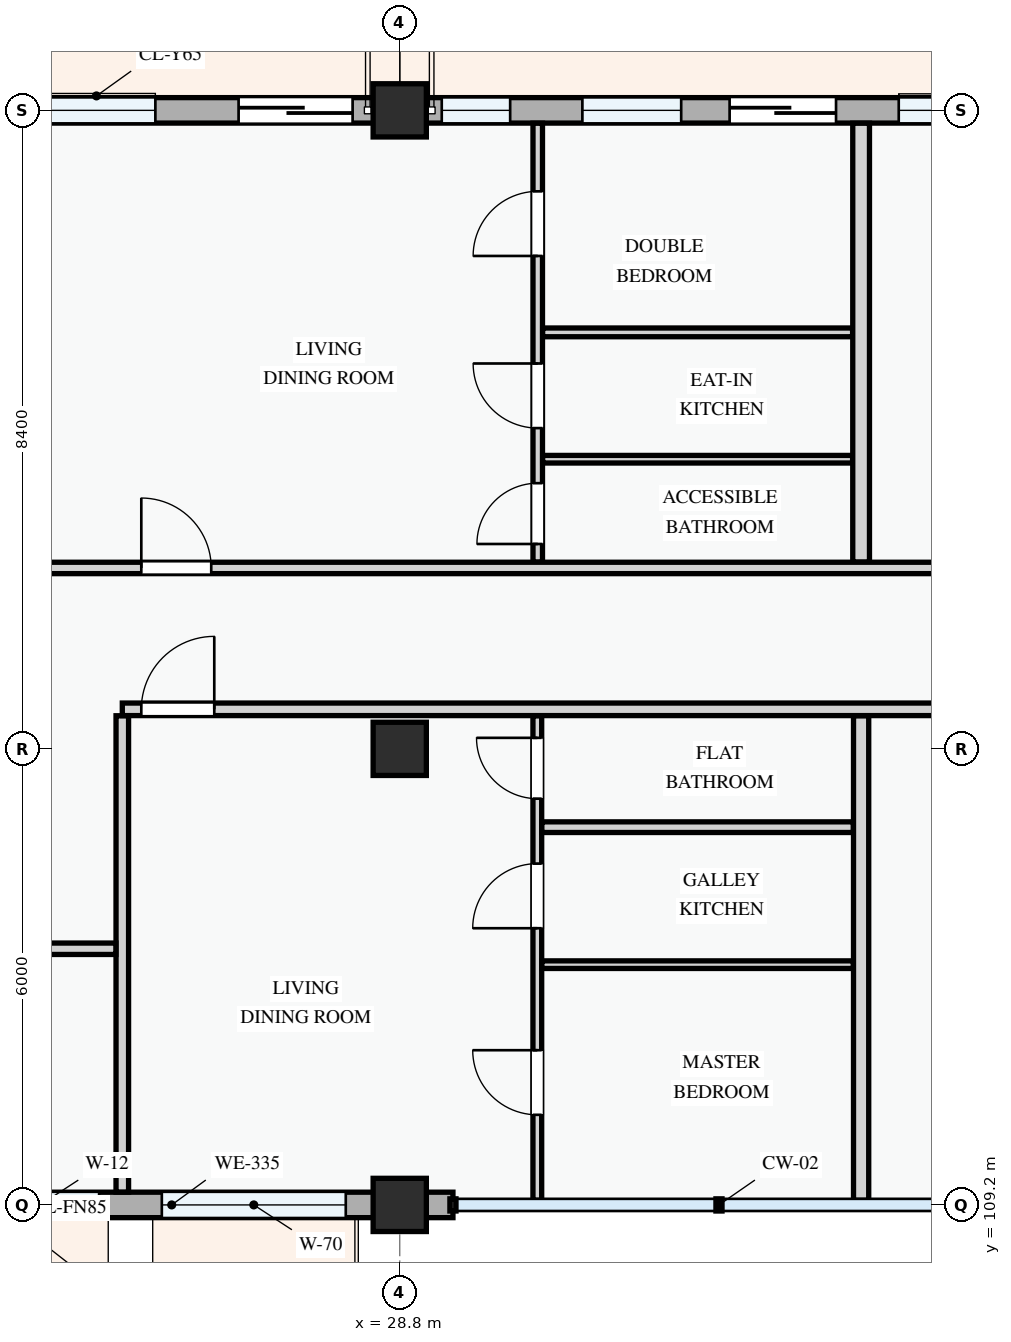
"""IFC4 building model, lengths in metres.
Left out: names, types, materials, properties, quantities, classifications, styles, units other than length and angle.
Written with IfcOpenShell. Run it as: python <this file> out.ifc"""

import sys

from ifc_helpers import new_model, si_unit, direction, frame, frame_2d, origin, origin_2d, place, context, subcontext, project, spatial, rectangle, extrude, element, fill, save


model = new_model("IFC4")
c1 = context("Model", 3, precision=1e-05, world=origin(), true_north=direction((0.0, 1.0)))
c2 = subcontext(c1, "Body", "Model", "MODEL_VIEW")
j1 = project(units=[si_unit("LENGTHUNIT", "METRE"), si_unit("PLANEANGLEUNIT", "RADIAN")], contexts=[c1])
p1 = place(None, origin())
s1 = spatial("IfcSite", under=j1, at=p1, CompositionType="ELEMENT")
p2 = place(p1, origin())
s2 = spatial("IfcBuilding", under=s1, at=p2, CompositionType="ELEMENT")
p3 = place(p2, frame((0.0, 0.0, 18.0)))
s3 = spatial("IfcBuildingStorey", under=s2, at=p3, CompositionType="ELEMENT", Elevation=18.0)
for number, where, z_axis, x_axis in (
    (1, (28.8, 109.2, 0.0), (0.0, 0.0, 1.0), (1.0, 0.0, 0.0)),
    (2, (28.8, 115.2, 0.0), (0.0, 0.0, 1.0), (1.0, 0.0, 0.0)),
    (3, (28.8, 123.6, 0.0), (0.0, 0.0, 1.0), (1.0, 0.0, 0.0)),
):
    element("IfcColumn", number, at=place(p3, frame(where, z_axis=z_axis, x_axis=x_axis)), inside=s3, PredefinedType="COLUMN", context=c2, shape_type="SweptSolid", body=[
        extrude(rectangle(XDim=0.7, YDim=0.7, at=origin_2d()), origin(), (0.0, 0.0, 1.0), 3.3),
    ])
p4 = place(p3, frame((22.8, 109.2, 0.0), z_axis=(0.0, 0.0, 1.0), x_axis=(1.0, 0.0, 0.0)))
e4 = element("IfcWall", 4, at=p4, inside=s3, PredefinedType="STANDARD", context=c2, shape_type="SweptSolid", body=[
    extrude(rectangle(XDim=6.0, YDim=0.335, at=frame_2d((3.0, 0.0))), origin(), (0.0, 0.0, 1.0), 2.475),
])
p5 = place(p4, frame((0.495, 0.0, 0.78)))
e5 = element("IfcOpeningElement", 5, at=p5, cuts=e4, PredefinedType="OPENING", context=c2, shape_type="SweptSolid", body=[
    extrude(rectangle(XDim=1.55, YDim=1.4, at=frame_2d((0.775, 0.7))), frame((0.0, 0.177, 0.0), z_axis=(0.0, -1.0, 0.0), x_axis=(1.0, 0.0, 0.0)), (0.0, 0.0, 1.0), 0.355),
])
p6 = place(p4, frame((2.87, 0.0, 0.78)))
e6 = element("IfcOpeningElement", 6, at=p6, cuts=e4, PredefinedType="OPENING", context=c2, shape_type="SweptSolid", body=[
    extrude(rectangle(XDim=2.42, YDim=1.52, at=frame_2d((1.21, 0.76))), frame((0.0, 0.177, 0.0), z_axis=(0.0, -1.0, 0.0), x_axis=(1.0, 0.0, 0.0)), (0.0, 0.0, 1.0), 0.355),
])
p7 = place(p3, frame((28.8, 109.2, 0.0), z_axis=(0.0, 0.0, 1.0), x_axis=(1.0, 0.0, 0.0)))
e7 = element("IfcWall", 7, at=p7, inside=s3, PredefinedType="STANDARD", context=c2, shape_type="SweptSolid", body=[
    extrude(rectangle(XDim=0.7, YDim=0.335, at=frame_2d((0.35, 0.0))), origin(), (0.0, 0.0, 1.0), 2.375),
])
p8 = place(p3, frame((37.2, 123.6, 0.0), z_axis=(0.0, 0.0, 1.0), x_axis=(-1.0, 0.0, 0.0)))
e8 = element("IfcWall", 8, at=p8, inside=s3, PredefinedType="STANDARD", context=c2, shape_type="SweptSolid", body=[
    extrude(rectangle(XDim=8.4, YDim=0.335, at=frame_2d((4.2, 0.0))), origin(), (0.0, 0.0, 1.0), 2.375),
])
p9 = place(p8, frame((2.66, 0.0, 0.0)))
e9 = element("IfcOpeningElement", 9, at=p9, cuts=e8, PredefinedType="OPENING", context=c2, shape_type="SweptSolid", body=[
    extrude(rectangle(XDim=1.4, YDim=2.2, at=frame_2d((0.7, 1.1))), frame((0.0, 0.177, 0.0), z_axis=(0.0, -1.0, 0.0), x_axis=(1.0, 0.0, 0.0)), (0.0, 0.0, 1.0), 0.355),
])
p10 = place(p8, frame((0.685, 0.0, 0.78)))
e10 = element("IfcOpeningElement", 10, at=p10, cuts=e8, PredefinedType="OPENING", context=c2, shape_type="SweptSolid", body=[
    extrude(rectangle(XDim=1.15, YDim=1.25, at=frame_2d((0.575, 0.625))), frame((0.0, 0.177, 0.0), z_axis=(0.0, -1.0, 0.0), x_axis=(1.0, 0.0, 0.0)), (0.0, 0.0, 1.0), 0.355),
])
p11 = place(p8, frame((4.697, 0.0, 0.78)))
e11 = element("IfcOpeningElement", 11, at=p11, cuts=e8, PredefinedType="OPENING", context=c2, shape_type="SweptSolid", body=[
    extrude(rectangle(XDim=1.3, YDim=1.4, at=frame_2d((0.65, 0.7))), frame((0.0, 0.177, 0.0), z_axis=(0.0, -1.0, 0.0), x_axis=(1.0, 0.0, 0.0)), (0.0, 0.0, 1.0), 0.355),
])
p12 = place(p8, frame((6.947, 0.0, 0.78)))
e12 = element("IfcOpeningElement", 12, at=p12, cuts=e8, PredefinedType="OPENING", context=c2, shape_type="SweptSolid", body=[
    extrude(rectangle(XDim=0.9, YDim=1.2, at=frame_2d((0.45, 0.6))), frame((0.0, 0.177, 0.0), z_axis=(0.0, -1.0, 0.0), x_axis=(1.0, 0.0, 0.0)), (0.0, 0.0, 1.0), 0.355),
])
p13 = place(p3, frame((28.8, 123.6, 0.0), z_axis=(0.0, 0.0, 1.0), x_axis=(-1.0, 0.0, 0.0)))
e13 = element("IfcWall", 13, at=p13, inside=s3, PredefinedType="STANDARD", context=c2, shape_type="SweptSolid", body=[
    extrude(rectangle(XDim=6.0, YDim=0.335, at=frame_2d((3.0, 0.0))), origin(), (0.0, 0.0, 1.0), 2.475),
])
p14 = place(p13, frame((0.62, 0.0, 0.0)))
e14 = element("IfcOpeningElement", 14, at=p14, cuts=e13, PredefinedType="OPENING", context=c2, shape_type="SweptSolid", body=[
    extrude(rectangle(XDim=1.5, YDim=2.2, at=frame_2d((0.75, 1.1))), frame((0.0, 0.177, 0.0), z_axis=(0.0, -1.0, 0.0), x_axis=(1.0, 0.0, 0.0)), (0.0, 0.0, 1.0), 0.355),
])
p15 = place(p13, frame((3.215, 0.0, 0.78)))
e15 = element("IfcOpeningElement", 15, at=p15, cuts=e13, PredefinedType="OPENING", context=c2, shape_type="SweptSolid", body=[
    extrude(rectangle(XDim=1.55, YDim=1.4, at=frame_2d((0.775, 0.7))), frame((0.0, 0.177, 0.0), z_axis=(0.0, -1.0, 0.0), x_axis=(1.0, 0.0, 0.0)), (0.0, 0.0, 1.0), 0.355),
])
p16 = place(p3, frame((25.15, 109.369, 0.0), z_axis=(0.0, 0.0, 1.0), x_axis=(0.0, 1.0, 0.0)))
e16 = element("IfcWall", 16, at=p16, inside=s3, PredefinedType="PARTITIONING", context=c2, shape_type="SweptSolid", body=[
    extrude(rectangle(XDim=6.266, YDim=0.165, at=frame_2d((3.133, 0.0))), origin(), (0.0, 0.0, 1.0), 3.0),
])
p17 = place(p3, frame((22.66, 112.57, 0.0), z_axis=(0.0, 0.0, 1.0), x_axis=(1.0, 0.0, 0.0)))
e17 = element("IfcWall", 17, at=p17, inside=s3, PredefinedType="PARTITIONING", context=c2, shape_type="SweptSolid", body=[
    extrude(rectangle(XDim=2.406, YDim=0.15, at=frame_2d((1.203, 0.0))), origin(), (0.0, 0.0, 1.0), 3.0),
])
p18 = place(p3, frame((30.61, 109.26, 0.0), z_axis=(0.0, 0.0, 1.0), x_axis=(0.0, 1.0, 0.0)))
e18 = element("IfcWall", 18, at=p18, inside=s3, PredefinedType="PARTITIONING", context=c2, shape_type="SweptSolid", body=[
    extrude(rectangle(XDim=6.375, YDim=0.115, at=frame_2d((3.188, 0.0))), origin(), (0.0, 0.0, 1.0), 3.0),
])
p19 = place(p18, frame((1.125, 0.0, 0.0)))
e19 = element("IfcOpeningElement", 19, at=p19, cuts=e18, PredefinedType="OPENING", context=c2, shape_type="SweptSolid", body=[
    extrude(rectangle(XDim=0.85, YDim=2.1, at=frame_2d((0.425, 1.05))), frame((0.0, 0.067, 0.0), z_axis=(0.0, -1.0, 0.0), x_axis=(1.0, 0.0, 0.0)), (0.0, 0.0, 1.0), 0.135),
])
p20 = place(p18, frame((3.58, 0.0, 0.0)))
e20 = element("IfcOpeningElement", 20, at=p20, cuts=e18, PredefinedType="OPENING", context=c2, shape_type="SweptSolid", body=[
    extrude(rectangle(XDim=0.85, YDim=2.1, at=frame_2d((0.425, 1.05))), frame((0.0, 0.067, 0.0), z_axis=(0.0, -1.0, 0.0), x_axis=(1.0, 0.0, 0.0)), (0.0, 0.0, 1.0), 0.135),
])
p21 = place(p18, frame((5.285, 0.0, 0.0)))
e21 = element("IfcOpeningElement", 21, at=p21, cuts=e18, PredefinedType="OPENING", context=c2, shape_type="SweptSolid", body=[
    extrude(rectangle(XDim=0.8, YDim=2.1, at=frame_2d((0.4, 1.05))), frame((0.0, 0.067, 0.0), z_axis=(0.0, -1.0, 0.0), x_axis=(1.0, 0.0, 0.0)), (0.0, 0.0, 1.0), 0.135),
])
p22 = place(p3, frame((30.669, 112.361, 0.0), z_axis=(0.0, 0.0, 1.0), x_axis=(1.0, 0.0, 0.0)))
e22 = element("IfcWall", 22, at=p22, inside=s3, PredefinedType="PARTITIONING", context=c2, shape_type="SweptSolid", body=[
    extrude(rectangle(XDim=4.099, YDim=0.1, at=frame_2d((2.049, 0.0))), origin(), (0.0, 0.0, 1.0), 3.0),
])
p23 = place(p3, frame((30.669, 114.17, 0.0), z_axis=(0.0, 0.0, 1.0), x_axis=(1.0, 0.0, 0.0)))
e23 = element("IfcWall", 23, at=p23, inside=s3, PredefinedType="PARTITIONING", context=c2, shape_type="SweptSolid", body=[
    extrude(rectangle(XDim=4.099, YDim=0.14, at=frame_2d((2.049, 0.0))), origin(), (0.0, 0.0, 1.0), 3.0),
])
p24 = place(p3, frame((30.615, 117.657, 0.0), z_axis=(0.0, 0.0, 1.0), x_axis=(0.0, 1.0, 0.0)))
e24 = element("IfcWall", 24, at=p24, inside=s3, PredefinedType="PARTITIONING", context=c2, shape_type="SweptSolid", body=[
    extrude(rectangle(XDim=5.773, YDim=0.125, at=frame_2d((2.887, 0.0))), origin(), (0.0, 0.0, 1.0), 3.0),
])
p25 = place(p24, frame((0.238, 0.0, 0.0)))
e25 = element("IfcOpeningElement", 25, at=p25, cuts=e24, PredefinedType="OPENING", context=c2, shape_type="SweptSolid", body=[
    extrude(rectangle(XDim=0.8, YDim=2.1, at=frame_2d((0.4, 1.05))), frame((0.0, 0.073, 0.0), z_axis=(0.0, -1.0, 0.0), x_axis=(1.0, 0.0, 0.0)), (0.0, 0.0, 1.0), 0.145),
])
p26 = place(p24, frame((1.763, 0.0, 0.0)))
e26 = element("IfcOpeningElement", 26, at=p26, cuts=e24, PredefinedType="OPENING", context=c2, shape_type="SweptSolid", body=[
    extrude(rectangle(XDim=0.85, YDim=2.1, at=frame_2d((0.425, 1.05))), frame((0.0, 0.073, 0.0), z_axis=(0.0, -1.0, 0.0), x_axis=(1.0, 0.0, 0.0)), (0.0, 0.0, 1.0), 0.145),
])
p27 = place(p24, frame((4.028, 0.0, 0.0)))
e27 = element("IfcOpeningElement", 27, at=p27, cuts=e24, PredefinedType="OPENING", context=c2, shape_type="SweptSolid", body=[
    extrude(rectangle(XDim=0.85, YDim=2.1, at=frame_2d((0.425, 1.05))), frame((0.0, 0.073, 0.0), z_axis=(0.0, -1.0, 0.0), x_axis=(1.0, 0.0, 0.0)), (0.0, 0.0, 1.0), 0.145),
])
p28 = place(p3, frame((30.68, 120.679, 0.0), z_axis=(0.0, 0.0, 1.0), x_axis=(1.0, 0.0, 0.0)))
e28 = element("IfcWall", 28, at=p28, inside=s3, PredefinedType="PARTITIONING", context=c2, shape_type="SweptSolid", body=[
    extrude(rectangle(XDim=4.078, YDim=0.115, at=frame_2d((2.039, 0.0))), origin(), (0.0, 0.0, 1.0), 3.0),
])
p29 = place(p3, frame((30.68, 119.01, 0.0), z_axis=(0.0, 0.0, 1.0), x_axis=(1.0, 0.0, 0.0)))
e29 = element("IfcWall", 29, at=p29, inside=s3, PredefinedType="PARTITIONING", context=c2, shape_type="SweptSolid", body=[
    extrude(rectangle(XDim=4.078, YDim=0.1, at=frame_2d((2.039, 0.0))), origin(), (0.0, 0.0, 1.0), 3.0),
])
p30 = place(p3, frame((34.87, 109.26, 0.0), z_axis=(0.0, 0.0, 1.0), x_axis=(0.0, 1.0, 0.0)))
e30 = element("IfcWall", 30, at=p30, inside=s3, PredefinedType="PARTITIONING", context=c2, shape_type="SweptSolid", body=[
    extrude(rectangle(XDim=6.375, YDim=0.2, at=frame_2d((3.188, 0.0))), origin(), (0.0, 0.0, 1.0), 3.0),
])
p31 = place(p3, frame((34.87, 117.657, 0.0), z_axis=(0.0, 0.0, 1.0), x_axis=(0.0, 1.0, 0.0)))
e31 = element("IfcWall", 31, at=p31, inside=s3, PredefinedType="PARTITIONING", context=c2, shape_type="SweptSolid", body=[
    extrude(rectangle(XDim=5.773, YDim=0.22, at=frame_2d((2.887, 0.0))), origin(), (0.0, 0.0, 1.0), 3.0),
])
p32 = place(p3, frame((25.15, 115.72, 0.0), z_axis=(0.0, 0.0, 1.0), x_axis=(1.0, 0.0, 0.0)))
e32 = element("IfcWall", 32, at=p32, inside=s3, PredefinedType="PARTITIONING", context=c2, shape_type="SweptSolid", body=[
    extrude(rectangle(XDim=32.281, YDim=0.165, at=frame_2d((16.14, 0.0))), origin(), (0.0, 0.0, 1.0), 3.0),
])
p33 = place(p32, frame((0.25, 0.0, 0.0)))
e33 = element("IfcOpeningElement", 33, at=p33, cuts=e32, PredefinedType="OPENING", context=c2, shape_type="SweptSolid", body=[
    extrude(rectangle(XDim=0.96, YDim=2.12, at=frame_2d((0.48, 1.06))), frame((0.0, 0.093, 0.0), z_axis=(0.0, -1.0, 0.0), x_axis=(1.0, 0.0, 0.0)), (0.0, 0.0, 1.0), 0.185),
])
p34 = place(p32, frame((14.015, 0.0, 0.0)))
e34 = element("IfcOpeningElement", 34, at=p34, cuts=e32, PredefinedType="OPENING", context=c2, shape_type="SweptSolid", body=[
    extrude(rectangle(XDim=0.92, YDim=2.1, at=frame_2d((0.46, 1.05))), frame((0.0, 0.093, 0.0), z_axis=(0.0, -1.0, 0.0), x_axis=(1.0, 0.0, 0.0)), (0.0, 0.0, 1.0), 0.185),
])
p35 = place(p32, frame((21.739, 0.0, 0.0)))
e35 = element("IfcOpeningElement", 35, at=p35, cuts=e32, PredefinedType="OPENING", context=c2, shape_type="SweptSolid", body=[
    extrude(rectangle(XDim=0.92, YDim=2.1, at=frame_2d((0.46, 1.05))), frame((0.0, 0.093, 0.0), z_axis=(0.0, -1.0, 0.0), x_axis=(1.0, 0.0, 0.0)), (0.0, 0.0, 1.0), 0.185),
])
p36 = place(p3, frame((22.66, 117.58, 0.0), z_axis=(0.0, 0.0, 1.0), x_axis=(1.0, 0.0, 0.0)))
e36 = element("IfcWall", 36, at=p36, inside=s3, PredefinedType="PARTITIONING", context=c2, shape_type="SweptSolid", body=[
    extrude(rectangle(XDim=34.88, YDim=0.15, at=frame_2d((17.44, 0.0))), origin(), (0.0, 0.0, 1.0), 3.0),
])
p37 = place(p36, frame((2.74, 0.0, 0.0)))
e37 = element("IfcOpeningElement", 37, at=p37, cuts=e36, PredefinedType="OPENING", context=c2, shape_type="SweptSolid", body=[
    extrude(rectangle(XDim=0.92, YDim=2.1, at=frame_2d((0.46, 1.05))), frame((0.0, 0.085, 0.0), z_axis=(0.0, -1.0, 0.0), x_axis=(1.0, 0.0, 0.0)), (0.0, 0.0, 1.0), 0.17),
])
p38 = place(p36, frame((16.285, 0.0, 0.0)))
e38 = element("IfcOpeningElement", 38, at=p38, cuts=e36, PredefinedType="OPENING", context=c2, shape_type="SweptSolid", body=[
    extrude(rectangle(XDim=0.92, YDim=2.1, at=frame_2d((0.46, 1.05))), frame((0.0, 0.085, 0.0), z_axis=(0.0, -1.0, 0.0), x_axis=(1.0, 0.0, 0.0)), (0.0, 0.0, 1.0), 0.17),
])
p39 = place(p36, frame((24.263, 0.0, 0.0)))
e39 = element("IfcOpeningElement", 39, at=p39, cuts=e36, PredefinedType="OPENING", context=c2, shape_type="SweptSolid", body=[
    extrude(rectangle(XDim=0.96, YDim=2.12, at=frame_2d((0.48, 1.06))), frame((0.0, 0.085, 0.0), z_axis=(0.0, -1.0, 0.0), x_axis=(1.0, 0.0, 0.0)), (0.0, 0.0, 1.0), 0.17),
])
p40 = place(p5, origin())
e40 = element("IfcWindow", 40, at=p40, inside=s3, PartitioningType="SINGLE_PANEL", PredefinedType="WINDOW", context=c2, shape_type="SweptSolid", body=[
    extrude(rectangle(XDim=1.55, YDim=1.4, at=frame_2d((0.775, 0.7))), frame((0.0, 0.03, 0.0), z_axis=(0.0, -1.0, 0.0), x_axis=(1.0, 0.0, 0.0)), (0.0, 0.0, 1.0), 0.06),
])
fill(e5, e40)
p41 = place(p6, origin())
e41 = element("IfcWindow", 41, at=p41, inside=s3, PartitioningType="DOUBLE_PANEL_VERTICAL", PredefinedType="WINDOW", context=c2, shape_type="SweptSolid", body=[
    extrude(rectangle(XDim=2.42, YDim=1.52, at=frame_2d((1.21, 0.76))), frame((0.0, 0.03, 0.0), z_axis=(0.0, -1.0, 0.0), x_axis=(1.0, 0.0, 0.0)), (0.0, 0.0, 1.0), 0.06),
])
fill(e6, e41)
p42 = place(p9, frame((1.4, 0.0, 0.0), z_axis=(0.0, 0.0, 1.0), x_axis=(-1.0, 0.0, 0.0)))
e42 = element("IfcDoor", 42, at=p42, inside=s3, OperationType="SLIDING_TO_LEFT", PredefinedType="DOOR", context=c2, shape_type="SweptSolid", body=[
    extrude(rectangle(XDim=1.4, YDim=2.2, at=frame_2d((0.7, 1.1))), frame((0.0, 0.025, 0.0), z_axis=(0.0, -1.0, 0.0), x_axis=(1.0, 0.0, 0.0)), (0.0, 0.0, 1.0), 0.05),
])
fill(e9, e42)
p43 = place(p10, origin())
e43 = element("IfcWindow", 43, at=p43, inside=s3, PartitioningType="SINGLE_PANEL", PredefinedType="WINDOW", context=c2, shape_type="SweptSolid", body=[
    extrude(rectangle(XDim=1.15, YDim=1.25, at=frame_2d((0.575, 0.625))), frame((0.0, 0.03, 0.0), z_axis=(0.0, -1.0, 0.0), x_axis=(1.0, 0.0, 0.0)), (0.0, 0.0, 1.0), 0.06),
])
fill(e10, e43)
p44 = place(p11, origin())
e44 = element("IfcWindow", 44, at=p44, inside=s3, PartitioningType="SINGLE_PANEL", PredefinedType="WINDOW", context=c2, shape_type="SweptSolid", body=[
    extrude(rectangle(XDim=1.3, YDim=1.4, at=frame_2d((0.65, 0.7))), frame((0.0, 0.03, 0.0), z_axis=(0.0, -1.0, 0.0), x_axis=(1.0, 0.0, 0.0)), (0.0, 0.0, 1.0), 0.06),
])
fill(e11, e44)
p45 = place(p12, origin())
e45 = element("IfcWindow", 45, at=p45, inside=s3, PartitioningType="SINGLE_PANEL", PredefinedType="WINDOW", context=c2, shape_type="SweptSolid", body=[
    extrude(rectangle(XDim=0.9, YDim=1.2, at=frame_2d((0.45, 0.6))), frame((0.0, 0.03, 0.0), z_axis=(0.0, -1.0, 0.0), x_axis=(1.0, 0.0, 0.0)), (0.0, 0.0, 1.0), 0.06),
])
fill(e12, e45)
p46 = place(p14, frame((1.5, 0.0, 0.0), z_axis=(0.0, 0.0, 1.0), x_axis=(-1.0, 0.0, 0.0)))
e46 = element("IfcDoor", 46, at=p46, inside=s3, OperationType="SLIDING_TO_RIGHT", PredefinedType="DOOR", context=c2, shape_type="SweptSolid", body=[
    extrude(rectangle(XDim=1.5, YDim=2.2, at=frame_2d((0.75, 1.1))), frame((0.0, 0.025, 0.0), z_axis=(0.0, -1.0, 0.0), x_axis=(1.0, 0.0, 0.0)), (0.0, 0.0, 1.0), 0.05),
])
fill(e14, e46)
p47 = place(p15, origin())
e47 = element("IfcWindow", 47, at=p47, inside=s3, PartitioningType="SINGLE_PANEL", PredefinedType="WINDOW", context=c2, shape_type="SweptSolid", body=[
    extrude(rectangle(XDim=1.55, YDim=1.4, at=frame_2d((0.775, 0.7))), frame((0.0, 0.03, 0.0), z_axis=(0.0, -1.0, 0.0), x_axis=(1.0, 0.0, 0.0)), (0.0, 0.0, 1.0), 0.06),
])
fill(e15, e47)
p48 = place(p19, origin())
e48 = element("IfcDoor", 48, at=p48, inside=s3, OperationType="SINGLE_SWING_RIGHT", PredefinedType="DOOR", context=c2, shape_type="SweptSolid", body=[
    extrude(rectangle(XDim=0.85, YDim=2.1, at=frame_2d((0.425, 1.05))), frame((0.0, 0.025, 0.0), z_axis=(0.0, -1.0, 0.0), x_axis=(1.0, 0.0, 0.0)), (0.0, 0.0, 1.0), 0.05),
])
fill(e19, e48)
p49 = place(p20, origin())
e49 = element("IfcDoor", 49, at=p49, inside=s3, OperationType="SINGLE_SWING_LEFT", PredefinedType="DOOR", context=c2, shape_type="SweptSolid", body=[
    extrude(rectangle(XDim=0.85, YDim=2.1, at=frame_2d((0.425, 1.05))), frame((0.0, 0.025, 0.0), z_axis=(0.0, -1.0, 0.0), x_axis=(1.0, 0.0, 0.0)), (0.0, 0.0, 1.0), 0.05),
])
fill(e20, e49)
p50 = place(p21, origin())
e50 = element("IfcDoor", 50, at=p50, inside=s3, OperationType="SINGLE_SWING_RIGHT", PredefinedType="DOOR", context=c2, shape_type="SweptSolid", body=[
    extrude(rectangle(XDim=0.8, YDim=2.1, at=frame_2d((0.4, 1.05))), frame((0.0, 0.025, 0.0), z_axis=(0.0, -1.0, 0.0), x_axis=(1.0, 0.0, 0.0)), (0.0, 0.0, 1.0), 0.05),
])
fill(e21, e50)
p51 = place(p25, origin())
e51 = element("IfcDoor", 51, at=p51, inside=s3, OperationType="SINGLE_SWING_LEFT", PredefinedType="DOOR", context=c2, shape_type="SweptSolid", body=[
    extrude(rectangle(XDim=0.8, YDim=2.1, at=frame_2d((0.4, 1.05))), frame((0.0, 0.025, 0.0), z_axis=(0.0, -1.0, 0.0), x_axis=(1.0, 0.0, 0.0)), (0.0, 0.0, 1.0), 0.05),
])
fill(e25, e51)
p52 = place(p26, origin())
e52 = element("IfcDoor", 52, at=p52, inside=s3, OperationType="SINGLE_SWING_RIGHT", PredefinedType="DOOR", context=c2, shape_type="SweptSolid", body=[
    extrude(rectangle(XDim=0.85, YDim=2.1, at=frame_2d((0.425, 1.05))), frame((0.0, 0.025, 0.0), z_axis=(0.0, -1.0, 0.0), x_axis=(1.0, 0.0, 0.0)), (0.0, 0.0, 1.0), 0.05),
])
fill(e26, e52)
p53 = place(p27, origin())
e53 = element("IfcDoor", 53, at=p53, inside=s3, OperationType="SINGLE_SWING_LEFT", PredefinedType="DOOR", context=c2, shape_type="SweptSolid", body=[
    extrude(rectangle(XDim=0.85, YDim=2.1, at=frame_2d((0.425, 1.05))), frame((0.0, 0.025, 0.0), z_axis=(0.0, -1.0, 0.0), x_axis=(1.0, 0.0, 0.0)), (0.0, 0.0, 1.0), 0.05),
])
fill(e27, e53)
p54 = place(p33, origin())
e54 = element("IfcDoor", 54, at=p54, inside=s3, OperationType="SINGLE_SWING_RIGHT", PredefinedType="DOOR", context=c2, shape_type="SweptSolid", body=[
    extrude(rectangle(XDim=0.96, YDim=2.12, at=frame_2d((0.48, 1.06))), frame((0.0, 0.025, 0.0), z_axis=(0.0, -1.0, 0.0), x_axis=(1.0, 0.0, 0.0)), (0.0, 0.0, 1.0), 0.05),
])
fill(e33, e54)
p55 = place(p37, origin())
e55 = element("IfcDoor", 55, at=p55, inside=s3, OperationType="SINGLE_SWING_LEFT", PredefinedType="DOOR", context=c2, shape_type="SweptSolid", body=[
    extrude(rectangle(XDim=0.92, YDim=2.1, at=frame_2d((0.46, 1.05))), frame((0.0, 0.025, 0.0), z_axis=(0.0, -1.0, 0.0), x_axis=(1.0, 0.0, 0.0)), (0.0, 0.0, 1.0), 0.05),
])
fill(e37, e55)
save(model, sys.argv[1])
